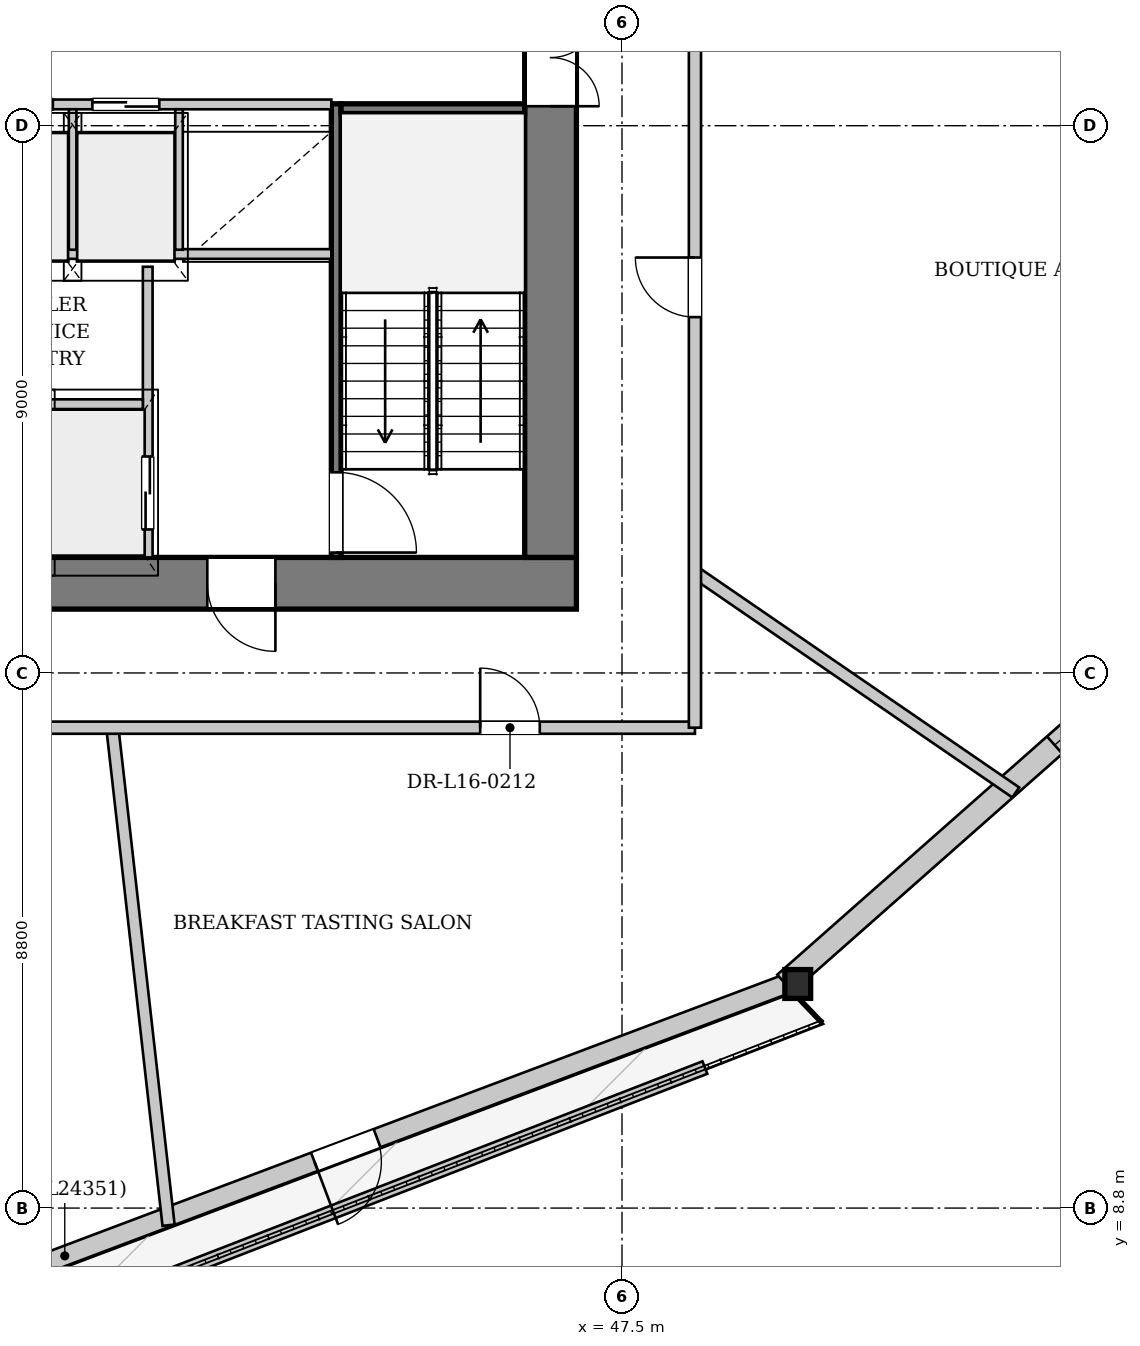
"""IFC4 building model, lengths in metres.
Left out: names, types, materials, properties, quantities, classifications, styles, units other than length and angle.
Written with IfcOpenShell. Run it as: python <this file> out.ifc"""

import sys

from ifc_helpers import new_model, si_unit, direction, frame, frame_2d, origin, origin_2d, place, context, subcontext, project, spatial, rectangle, i_section, extrude, source, transform, mapped, element, fill, save


model = new_model("IFC4")
c1 = context("Model", 3, precision=1e-05, world=origin(), true_north=direction((0.0, 1.0)))
c2 = subcontext(c1, "Body", "Model", "MODEL_VIEW")
j1 = project(units=[si_unit("LENGTHUNIT", "METRE"), si_unit("PLANEANGLEUNIT", "RADIAN")], contexts=[c1])
p1 = place(None, origin())
s1 = spatial("IfcSite", under=j1, at=p1, CompositionType="ELEMENT")
p2 = place(p1, origin())
s2 = spatial("IfcBuilding", under=s1, at=p2, CompositionType="ELEMENT")
p3 = place(p2, frame((0.0, 0.0, 64.8)))
s3 = spatial("IfcBuildingStorey", under=s2, at=p3, CompositionType="ELEMENT", Elevation=64.8)
m1 = source(origin(), c2, "Body", "SweptSolid", [
    extrude(i_section(OverallWidth=0.424, OverallDepth=0.474, WebThickness=0.043, FlangeThickness=0.068, at=origin_2d()), origin(), (0.0, 0.0, 1.0), 3.399),
])
p4 = place(p3, frame((50.305, 12.354, 0.0), z_axis=(0.050128014439, 0.077418337487, 0.995737708028), x_axis=(-0.839402988902, 0.543509541979, 0.0)))
e1 = element("IfcColumn", 1, at=p4, inside=s3, PredefinedType="COLUMN", context=c2, shape_type="MappedRepresentation", body=[
    mapped(m1, transform((0.0, 0.0, 0.0), x_axis=(1.0, 0.0, 0.0), y_axis=(0.0, 1.0, 0.0), z_axis=(0.0, 0.0, 1.0), scale=1.0)),
])
p5 = place(p3, frame((50.249, 12.503, 0.0), z_axis=(0.0, 0.0, 1.0), x_axis=(-0.935754406197, -0.352652366054, 0.0)))
e2 = element("IfcWall", 2, at=p5, inside=s3, PredefinedType="SOLIDWALL", context=c2, shape_type="SweptSolid", body=[
    extrude(rectangle(XDim=24.352, YDim=0.32, at=frame_2d((12.176, 0.0))), origin(), (0.0, 0.0, 1.0), 2.592),
])
p6 = place(p5, frame((7.242, 0.0, 0.0)))
e3 = element("IfcOpeningElement", 3, at=p6, cuts=e2, PredefinedType="OPENING", context=c2, shape_type="SweptSolid", body=[
    extrude(rectangle(XDim=1.1, YDim=2.3, at=frame_2d((0.55, 1.15))), frame((0.0, 0.17, 0.0), z_axis=(0.0, -1.0, 0.0), x_axis=(1.0, 0.0, 0.0)), (0.0, 0.0, 1.0), 0.34),
])
p7 = place(p5, frame((17.12, 0.0, 0.272)))
e4 = element("IfcOpeningElement", 4, at=p7, cuts=e2, PredefinedType="OPENING", context=c2, shape_type="SweptSolid", body=[
    extrude(rectangle(XDim=1.8, YDim=2.2, at=frame_2d((0.9, 1.1))), frame((0.0, 0.17, 0.0), z_axis=(0.0, -1.0, 0.0), x_axis=(1.0, 0.0, 0.0)), (0.0, 0.0, 1.0), 0.34),
])
p8 = place(p3, frame((68.432, 28.615, 0.0), z_axis=(0.0, 0.0, 1.0), x_axis=(-0.749537297232, -0.661962113763, 0.0)))
e5 = element("IfcWall", 5, at=p8, inside=s3, PredefinedType="SOLIDWALL", context=c2, shape_type="SweptSolid", body=[
    extrude(rectangle(XDim=24.351, YDim=0.38, at=frame_2d((12.176, 0.0))), origin(), (0.0, 0.0, 1.0), 2.592),
])
p9 = place(p8, frame((5.718, 0.0, 0.222)))
e6 = element("IfcOpeningElement", 6, at=p9, cuts=e5, PredefinedType="OPENING", context=c2, shape_type="SweptSolid", body=[
    extrude(rectangle(XDim=2.2, YDim=2.25, at=frame_2d((1.1, 1.125))), frame((0.0, 0.2, 0.0), z_axis=(0.0, -1.0, 0.0), x_axis=(1.0, 0.0, 0.0)), (0.0, 0.0, 1.0), 0.4),
])
p10 = place(p8, frame((16.233, 0.0, 0.222)))
e7 = element("IfcOpeningElement", 7, at=p10, cuts=e5, PredefinedType="OPENING", context=c2, shape_type="SweptSolid", body=[
    extrude(rectangle(XDim=2.2, YDim=2.25, at=frame_2d((1.1, 1.125))), frame((0.0, 0.2, 0.0), z_axis=(0.0, -1.0, 0.0), x_axis=(1.0, 0.0, 0.0)), (0.0, 0.0, 1.0), 0.4),
])
p11 = place(p3, frame((28.714, 3.29, 0.0), z_axis=(0.0, 0.0, 1.0), x_axis=(0.932244858771, 0.361828030003, 0.0)))
e8 = element("IfcWall", 8, at=p11, inside=s3, PredefinedType="PARAPET", context=c2, shape_type="SweptSolid", body=[
    extrude(rectangle(XDim=21.613, YDim=0.22, at=frame_2d((10.807, 0.0))), origin(), (0.0, 0.0, 1.0), 0.3),
])
p12 = place(p3, frame((46.75, 19.075, 0.0), z_axis=(0.0, 0.0, 1.0), x_axis=(-1.0, 0.0, 0.0)))
e9 = element("IfcWall", 9, at=p12, inside=s3, PredefinedType="SHEAR", context=c2, shape_type="SweptSolid", body=[
    extrude(rectangle(XDim=17.5, YDim=0.85, at=frame_2d((8.75, 0.0))), origin(), (0.0, 0.0, 1.0), 3.3),
])
p13 = place(p12, frame((4.95, 0.0, 0.0)))
e10 = element("IfcOpeningElement", 10, at=p13, cuts=e9, PredefinedType="OPENING", context=c2, shape_type="SweptSolid", body=[
    extrude(rectangle(XDim=1.12, YDim=2.25, at=frame_2d((0.56, 1.125))), frame((0.0, 0.435, 0.0), z_axis=(0.0, -1.0, 0.0), x_axis=(1.0, 0.0, 0.0)), (0.0, 0.0, 1.0), 0.87),
])
p14 = place(p12, frame((11.45, 0.0, 0.0)))
e11 = element("IfcOpeningElement", 11, at=p14, cuts=e9, PredefinedType="OPENING", context=c2, shape_type="SweptSolid", body=[
    extrude(rectangle(XDim=1.12, YDim=2.25, at=frame_2d((0.56, 1.125))), frame((0.0, 0.435, 0.0), z_axis=(0.0, -1.0, 0.0), x_axis=(1.0, 0.0, 0.0)), (0.0, 0.0, 1.0), 0.87),
])
p15 = place(p3, frame((46.325, 33.7, 0.0), z_axis=(0.0, 0.0, 1.0), x_axis=(0.0, -1.0, 0.0)))
e12 = element("IfcWall", 12, at=p15, inside=s3, PredefinedType="SHEAR", context=c2, shape_type="SweptSolid", body=[
    extrude(rectangle(XDim=14.2, YDim=0.85, at=frame_2d((7.1, 0.0))), origin(), (0.0, 0.0, 1.0), 3.3),
])
p16 = place(p15, frame((5.18, 0.0, 0.0)))
e13 = element("IfcOpeningElement", 13, at=p16, cuts=e12, PredefinedType="OPENING", context=c2, shape_type="SweptSolid", body=[
    extrude(rectangle(XDim=1.6, YDim=2.2, at=frame_2d((0.8, 1.1))), frame((0.0, 0.435, 0.0), z_axis=(0.0, -1.0, 0.0), x_axis=(1.0, 0.0, 0.0)), (0.0, 0.0, 1.0), 0.87),
])
p17 = place(p3, frame((42.8, 26.96, 0.0), z_axis=(0.0, 0.0, 1.0), x_axis=(0.0, -1.0, 0.0)))
e14 = element("IfcWall", 14, at=p17, inside=s3, PredefinedType="PARTITIONING", context=c2, shape_type="SweptSolid", body=[
    extrude(rectangle(XDim=7.46, YDim=0.16, at=frame_2d((3.73, 0.0))), origin(), (0.0, 0.0, 1.0), 3.3),
])
p18 = place(p17, frame((6.06, 0.0, 0.0)))
e15 = element("IfcOpeningElement", 15, at=p18, cuts=e14, PredefinedType="OPENING", context=c2, shape_type="SweptSolid", body=[
    extrude(rectangle(XDim=1.32, YDim=2.2, at=frame_2d((0.66, 1.1))), frame((0.0, 0.09, 0.0), z_axis=(0.0, -1.0, 0.0), x_axis=(1.0, 0.0, 0.0)), (0.0, 0.0, 1.0), 0.18),
])
p19 = place(p3, frame((42.88, 26.88, 0.0), z_axis=(0.0, 0.0, 1.0), x_axis=(1.0, 0.0, 0.0)))
e16 = element("IfcWall", 16, at=p19, inside=s3, PredefinedType="PARTITIONING", context=c2, shape_type="SweptSolid", body=[
    extrude(rectangle(XDim=3.02, YDim=0.16, at=frame_2d((1.51, 0.0))), origin(), (0.0, 0.0, 1.0), 3.3),
])
p20 = place(p3, frame((39.7, 24.28, 0.0), z_axis=(0.0, 0.0, 1.0), x_axis=(0.0, -1.0, 0.0)))
e17 = element("IfcWall", 17, at=p20, inside=s3, PredefinedType="PARTITIONING", context=c2, shape_type="SweptSolid", body=[
    extrude(rectangle(XDim=4.78, YDim=0.16, at=frame_2d((2.39, 0.0))), origin(), (0.0, 0.0, 1.0), 3.3),
])
p21 = place(p20, frame((3.12, 0.0, 0.0)))
e18 = element("IfcOpeningElement", 18, at=p21, cuts=e17, PredefinedType="OPENING", context=c2, shape_type="SweptSolid", body=[
    extrude(rectangle(XDim=1.2, YDim=2.2, at=frame_2d((0.6, 1.1))), frame((0.0, 0.09, 0.0), z_axis=(0.0, -1.0, 0.0), x_axis=(1.0, 0.0, 0.0)), (0.0, 0.0, 1.0), 0.18),
])
p22 = place(p3, frame((36.38, 22.02, 0.0), z_axis=(0.0, 0.0, 1.0), x_axis=(1.0, 0.0, 0.0)))
e19 = element("IfcWall", 19, at=p22, inside=s3, PredefinedType="PARTITIONING", context=c2, shape_type="SweptSolid", body=[
    extrude(rectangle(XDim=3.24, YDim=0.16, at=frame_2d((1.62, 0.0))), origin(), (0.0, 0.0, 1.0), 3.3),
])
p23 = place(p3, frame((33.28, 24.49, 0.0), z_axis=(0.0, 0.0, 1.0), x_axis=(1.0, 0.0, 0.0)))
e20 = element("IfcWall", 20, at=p23, inside=s3, PredefinedType="PARTITIONING", context=c2, shape_type="SweptSolid", body=[
    extrude(rectangle(XDim=9.44, YDim=0.16, at=frame_2d((4.72, 0.0))), origin(), (0.0, 0.0, 1.0), 3.3),
])
p24 = place(p3, frame((33.28, 26.95, 0.0), z_axis=(0.0, 0.0, 1.0), x_axis=(1.0, 0.0, 0.0)))
e21 = element("IfcWall", 21, at=p24, inside=s3, PredefinedType="PARTITIONING", context=c2, shape_type="SweptSolid", body=[
    extrude(rectangle(XDim=9.44, YDim=0.16, at=frame_2d((4.72, 0.0))), origin(), (0.0, 0.0, 1.0), 3.3),
])
p25 = place(p24, frame((0.26, 0.0, 0.0)))
e22 = element("IfcOpeningElement", 22, at=p25, cuts=e21, PredefinedType="OPENING", context=c2, shape_type="SweptSolid", body=[
    extrude(rectangle(XDim=1.1, YDim=2.2, at=frame_2d((0.55, 1.1))), frame((0.0, 0.09, 0.0), z_axis=(0.0, -1.0, 0.0), x_axis=(1.0, 0.0, 0.0)), (0.0, 0.0, 1.0), 0.18),
])
p26 = place(p24, frame((2.01, 0.0, 0.0)))
e23 = element("IfcOpeningElement", 23, at=p26, cuts=e21, PredefinedType="OPENING", context=c2, shape_type="SweptSolid", body=[
    extrude(rectangle(XDim=1.1, YDim=2.2, at=frame_2d((0.55, 1.1))), frame((0.0, 0.09, 0.0), z_axis=(0.0, -1.0, 0.0), x_axis=(1.0, 0.0, 0.0)), (0.0, 0.0, 1.0), 0.18),
])
p27 = place(p24, frame((3.76, 0.0, 0.0)))
e24 = element("IfcOpeningElement", 24, at=p27, cuts=e21, PredefinedType="OPENING", context=c2, shape_type="SweptSolid", body=[
    extrude(rectangle(XDim=1.1, YDim=2.2, at=frame_2d((0.55, 1.1))), frame((0.0, 0.09, 0.0), z_axis=(0.0, -1.0, 0.0), x_axis=(1.0, 0.0, 0.0)), (0.0, 0.0, 1.0), 0.18),
])
p28 = place(p24, frame((5.51, 0.0, 0.0)))
e25 = element("IfcOpeningElement", 25, at=p28, cuts=e21, PredefinedType="OPENING", context=c2, shape_type="SweptSolid", body=[
    extrude(rectangle(XDim=1.1, YDim=2.2, at=frame_2d((0.55, 1.1))), frame((0.0, 0.09, 0.0), z_axis=(0.0, -1.0, 0.0), x_axis=(1.0, 0.0, 0.0)), (0.0, 0.0, 1.0), 0.18),
])
for number, where, z_axis, x_axis in (
    (26, (38.465, 24.56, 0.0), (0.0, 0.0, 1.0), (0.0, 1.0, 0.0)),
    (27, (40.215, 24.56, 0.0), (0.0, 0.0, 1.0), (0.0, 1.0, 0.0)),
):
    element("IfcWall", number, at=place(p3, frame(where, z_axis=z_axis, x_axis=x_axis)), inside=s3, PredefinedType="PARTITIONING", context=c2, shape_type="SweptSolid", body=[
        extrude(rectangle(XDim=2.31, YDim=0.125, at=frame_2d((1.155, 0.0))), origin(), (0.0, 0.0, 1.0), 3.3),
    ])
p29 = place(p3, frame((39.118, 16.7, 0.0), z_axis=(0.0, 0.0, 1.0), x_axis=(0.112253711385, -0.993679578275, 0.0)))
e28 = element("IfcWall", 28, at=p29, inside=s3, PredefinedType="PARTITIONING", context=c2, shape_type="SweptSolid", body=[
    extrude(rectangle(XDim=8.234, YDim=0.2, at=frame_2d((4.117, 0.0))), origin(), (0.0, 0.0, 1.0), 3.3),
])
p30 = place(p3, frame((48.7, 19.256, 0.0), z_axis=(0.0, 0.0, 1.0), x_axis=(0.824484731909, -0.565884199152, 0.0)))
e29 = element("IfcWall", 29, at=p30, inside=s3, PredefinedType="PARTITIONING", context=c2, shape_type="SweptSolid", body=[
    extrude(rectangle(XDim=6.399, YDim=0.2, at=frame_2d((3.199, 0.0))), origin(), (0.0, 0.0, 1.0), 3.3),
])
p31 = place(p3, frame((27.3, 16.7, 0.0), z_axis=(0.0, 0.0, 1.0), x_axis=(1.0, 0.0, 0.0)))
e30 = element("IfcWall", 30, at=p31, inside=s3, PredefinedType="PARTITIONING", context=c2, shape_type="SweptSolid", body=[
    extrude(rectangle(XDim=21.4, YDim=0.2, at=frame_2d((10.7, 0.0))), origin(), (0.0, 0.0, 1.0), 3.3),
])
p32 = place(p31, frame((7.0, 0.0, 0.0)))
e31 = element("IfcOpeningElement", 31, at=p32, cuts=e30, PredefinedType="OPENING", context=c2, shape_type="SweptSolid", body=[
    extrude(rectangle(XDim=0.98, YDim=2.15, at=frame_2d((0.49, 1.075))), frame((0.0, 0.11, 0.0), z_axis=(0.0, -1.0, 0.0), x_axis=(1.0, 0.0, 0.0)), (0.0, 0.0, 1.0), 0.22),
])
p33 = place(p31, frame((17.868, 0.0, 0.0)))
e32 = element("IfcOpeningElement", 32, at=p33, cuts=e30, PredefinedType="OPENING", context=c2, shape_type="SweptSolid", body=[
    extrude(rectangle(XDim=0.98, YDim=2.15, at=frame_2d((0.49, 1.075))), frame((0.0, 0.11, 0.0), z_axis=(0.0, -1.0, 0.0), x_axis=(1.0, 0.0, 0.0)), (0.0, 0.0, 1.0), 0.22),
])
p34 = place(p3, frame((48.7, 16.7, 0.0), z_axis=(0.0, 0.0, 1.0), x_axis=(0.0, 1.0, 0.0)))
e33 = element("IfcWall", 33, at=p34, inside=s3, PredefinedType="PARTITIONING", context=c2, shape_type="SweptSolid", body=[
    extrude(rectangle(XDim=19.8, YDim=0.2, at=frame_2d((9.9, 0.0))), origin(), (0.0, 0.0, 1.0), 3.3),
])
p35 = place(p34, frame((6.752, 0.0, 0.0)))
e34 = element("IfcOpeningElement", 34, at=p35, cuts=e33, PredefinedType="OPENING", context=c2, shape_type="SweptSolid", body=[
    extrude(rectangle(XDim=0.98, YDim=2.15, at=frame_2d((0.49, 1.075))), frame((0.0, 0.11, 0.0), z_axis=(0.0, -1.0, 0.0), x_axis=(1.0, 0.0, 0.0)), (0.0, 0.0, 1.0), 0.22),
])
p36 = place(p34, frame((17.487, 0.0, 0.0)))
e35 = element("IfcOpeningElement", 35, at=p36, cuts=e33, PredefinedType="OPENING", context=c2, shape_type="SweptSolid", body=[
    extrude(rectangle(XDim=0.98, YDim=2.15, at=frame_2d((0.49, 1.075))), frame((0.0, 0.11, 0.0), z_axis=(0.0, -1.0, 0.0), x_axis=(1.0, 0.0, 0.0)), (0.0, 0.0, 1.0), 0.22),
])
m2 = source(origin(), c2, "Body", "SweptSolid", [
    extrude(rectangle(XDim=1.1, YDim=2.3, at=frame_2d((0.55, 1.15))), frame((0.0, 0.025, 0.0), z_axis=(0.0, -1.0, 0.0), x_axis=(1.0, 0.0, 0.0)), (0.0, 0.0, 1.0), 0.05),
])
p37 = place(p6, origin())
e36 = element("IfcDoor", 36, at=p37, inside=s3, OperationType="SINGLE_SWING_RIGHT", PredefinedType="DOOR", context=c2, shape_type="MappedRepresentation", body=[
    mapped(m2, transform((0.0, 0.0, 0.0), x_axis=(1.0, 0.0, 0.0), y_axis=(0.0, 1.0, 0.0), z_axis=(0.0, 0.0, 1.0), scale=1.0)),
])
fill(e3, e36)
m3 = source(origin(), c2, "Body", "SweptSolid", [
    extrude(rectangle(XDim=2.2, YDim=2.25, at=frame_2d((1.1, 1.125))), frame((0.0, 0.03, 0.0), z_axis=(0.0, -1.0, 0.0), x_axis=(1.0, 0.0, 0.0)), (0.0, 0.0, 1.0), 0.06),
])
p38 = place(p10, origin())
e37 = element("IfcWindow", 37, at=p38, inside=s3, PartitioningType="SINGLE_PANEL", PredefinedType="WINDOW", context=c2, shape_type="MappedRepresentation", body=[
    mapped(m3, transform((0.0, 0.0, 0.0), x_axis=(1.0, 0.0, 0.0), y_axis=(0.0, 1.0, 0.0), z_axis=(0.0, 0.0, 1.0), scale=1.0)),
])
fill(e7, e37)
m4 = source(origin(), c2, "Body", "SweptSolid", [
    extrude(rectangle(XDim=1.12, YDim=2.25, at=frame_2d((0.56, 1.125))), frame((0.0, 0.025, 0.0), z_axis=(0.0, -1.0, 0.0), x_axis=(1.0, 0.0, 0.0)), (0.0, 0.0, 1.0), 0.05),
])
p39 = place(p13, origin())
e38 = element("IfcDoor", 38, at=p39, inside=s3, OperationType="SINGLE_SWING_LEFT", PredefinedType="DOOR", context=c2, shape_type="MappedRepresentation", body=[
    mapped(m4, transform((0.0, 0.0, 0.0), x_axis=(1.0, 0.0, 0.0), y_axis=(0.0, 1.0, 0.0), z_axis=(0.0, 0.0, 1.0), scale=1.0)),
])
fill(e10, e38)
m5 = source(origin(), c2, "Body", "SweptSolid", [
    extrude(rectangle(XDim=1.6, YDim=2.2, at=frame_2d((0.8, 1.1))), frame((0.0, 0.025, 0.0), z_axis=(0.0, -1.0, 0.0), x_axis=(1.0, 0.0, 0.0)), (0.0, 0.0, 1.0), 0.05),
])
p40 = place(p16, origin())
e39 = element("IfcDoor", 39, at=p40, inside=s3, OperationType="DOUBLE_DOOR_SINGLE_SWING", PredefinedType="DOOR", context=c2, shape_type="MappedRepresentation", body=[
    mapped(m5, transform((0.0, 0.0, 0.0), x_axis=(1.0, 0.0, 0.0), y_axis=(0.0, 1.0, 0.0), z_axis=(0.0, 0.0, 1.0), scale=1.0)),
])
fill(e13, e39)
m6 = source(origin(), c2, "Body", "SweptSolid", [
    extrude(rectangle(XDim=1.32, YDim=2.2, at=frame_2d((0.66, 1.1))), frame((0.0, 0.025, 0.0), z_axis=(0.0, -1.0, 0.0), x_axis=(1.0, 0.0, 0.0)), (0.0, 0.0, 1.0), 0.05),
])
p41 = place(p18, origin())
e40 = element("IfcDoor", 40, at=p41, inside=s3, OperationType="SINGLE_SWING_RIGHT", PredefinedType="DOOR", context=c2, shape_type="MappedRepresentation", body=[
    mapped(m6, transform((0.0, 0.0, 0.0), x_axis=(1.0, 0.0, 0.0), y_axis=(0.0, 1.0, 0.0), z_axis=(0.0, 0.0, 1.0), scale=1.0)),
])
fill(e15, e40)
m7 = source(origin(), c2, "Body", "SweptSolid", [
    extrude(rectangle(XDim=1.2, YDim=2.2, at=frame_2d((0.6, 1.1))), frame((0.0, 0.025, 0.0), z_axis=(0.0, -1.0, 0.0), x_axis=(1.0, 0.0, 0.0)), (0.0, 0.0, 1.0), 0.05),
])
p42 = place(p21, origin())
e41 = element("IfcDoor", 41, at=p42, inside=s3, OperationType="DOUBLE_DOOR_SLIDING", PredefinedType="DOOR", context=c2, shape_type="MappedRepresentation", body=[
    mapped(m7, transform((0.0, 0.0, 0.0), x_axis=(1.0, 0.0, 0.0), y_axis=(0.0, 1.0, 0.0), z_axis=(0.0, 0.0, 1.0), scale=1.0)),
])
fill(e18, e41)
m8 = source(origin(), c2, "Body", "SweptSolid", [
    extrude(rectangle(XDim=1.1, YDim=2.2, at=frame_2d((0.55, 1.1))), frame((0.0, 0.025, 0.0), z_axis=(0.0, -1.0, 0.0), x_axis=(1.0, 0.0, 0.0)), (0.0, 0.0, 1.0), 0.05),
])
p43 = place(p27, origin())
e42 = element("IfcDoor", 42, at=p43, inside=s3, OperationType="DOUBLE_DOOR_SLIDING", PredefinedType="DOOR", context=c2, shape_type="MappedRepresentation", body=[
    mapped(m8, transform((0.0, 0.0, 0.0), x_axis=(1.0, 0.0, 0.0), y_axis=(0.0, 1.0, 0.0), z_axis=(0.0, 0.0, 1.0), scale=1.0)),
])
fill(e24, e42)
p44 = place(p28, origin())
e43 = element("IfcDoor", 43, at=p44, inside=s3, OperationType="DOUBLE_DOOR_SLIDING", PredefinedType="DOOR", context=c2, shape_type="MappedRepresentation", body=[
    mapped(m8, transform((0.0, 0.0, 0.0), x_axis=(1.0, 0.0, 0.0), y_axis=(0.0, 1.0, 0.0), z_axis=(0.0, 0.0, 1.0), scale=1.0)),
])
fill(e25, e43)
m9 = source(origin(), c2, "Body", "SweptSolid", [
    extrude(rectangle(XDim=0.98, YDim=2.15, at=frame_2d((0.49, 1.075))), frame((0.0, 0.025, 0.0), z_axis=(0.0, -1.0, 0.0), x_axis=(1.0, 0.0, 0.0)), (0.0, 0.0, 1.0), 0.05),
])
p45 = place(p33, origin())
e44 = element("IfcDoor", 44, at=p45, inside=s3, OperationType="SINGLE_SWING_LEFT", PredefinedType="DOOR", context=c2, shape_type="MappedRepresentation", body=[
    mapped(m9, transform((0.0, 0.0, 0.0), x_axis=(1.0, 0.0, 0.0), y_axis=(0.0, 1.0, 0.0), z_axis=(0.0, 0.0, 1.0), scale=1.0)),
])
fill(e32, e44)
p46 = place(p35, origin())
e45 = element("IfcDoor", 45, at=p46, inside=s3, OperationType="SINGLE_SWING_RIGHT", PredefinedType="DOOR", context=c2, shape_type="MappedRepresentation", body=[
    mapped(m9, transform((0.0, 0.0, 0.0), x_axis=(1.0, 0.0, 0.0), y_axis=(0.0, 1.0, 0.0), z_axis=(0.0, 0.0, 1.0), scale=1.0)),
])
fill(e34, e45)
save(model, sys.argv[1])
